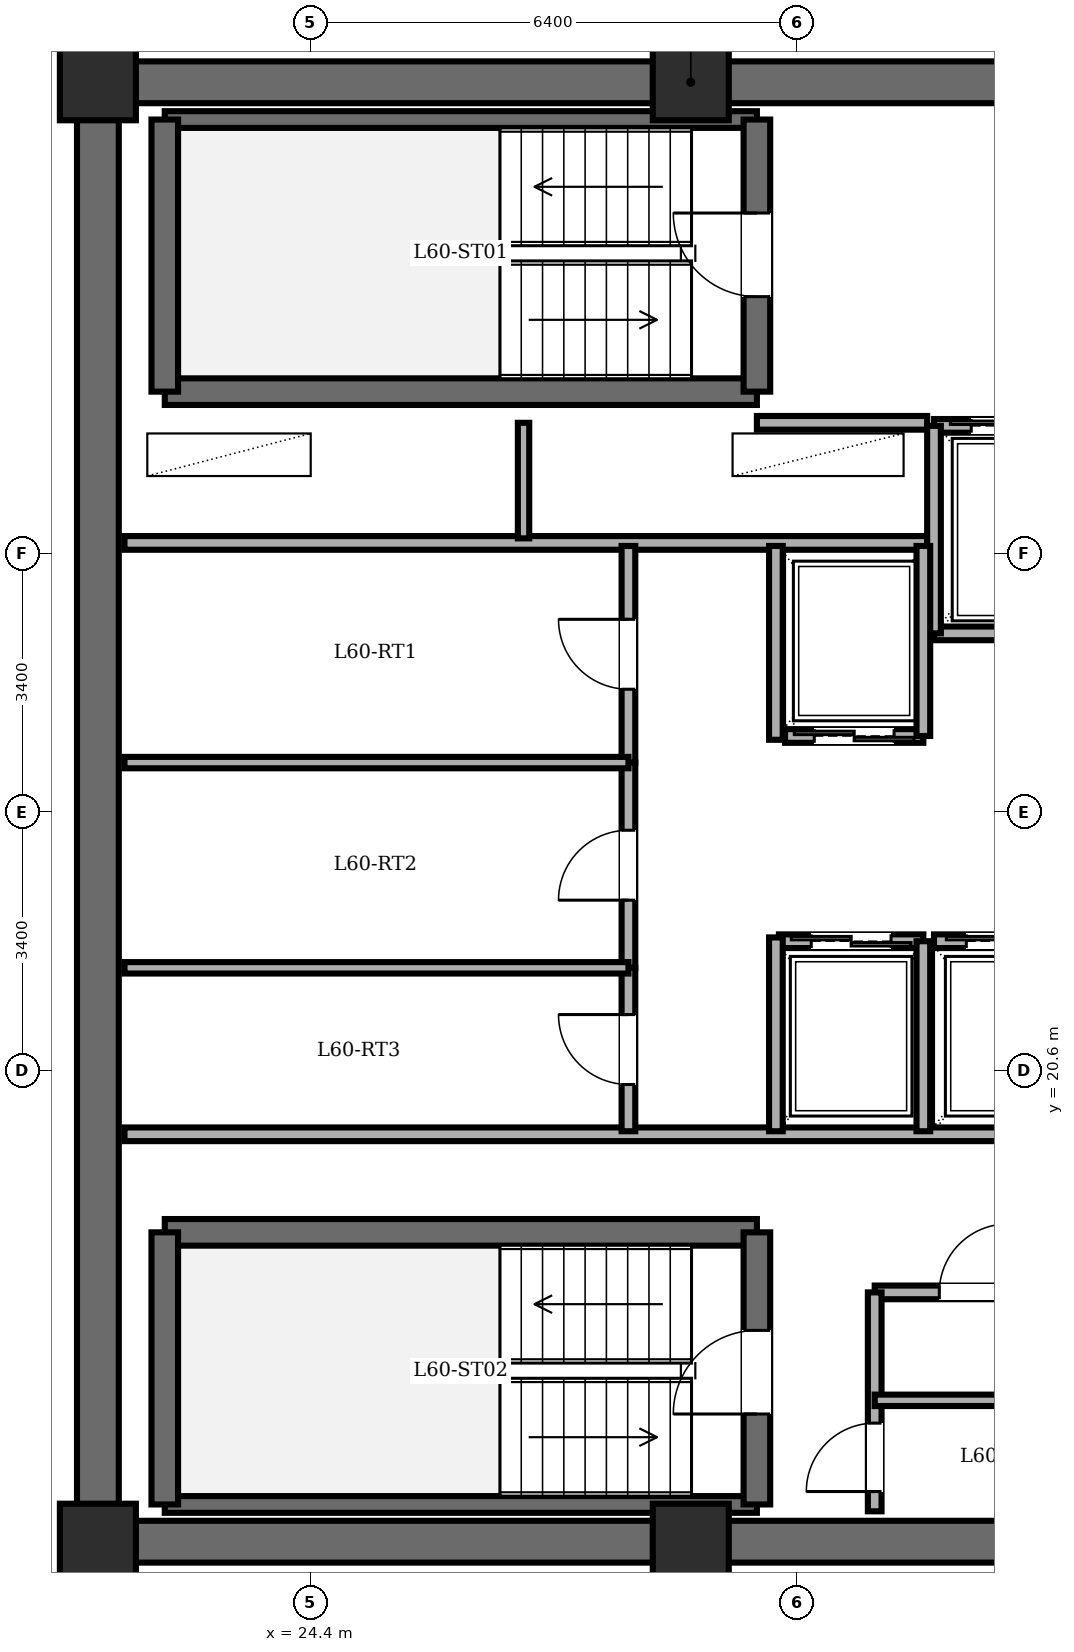
"""IFC4 building model, lengths in metres.
Left out: names, types, materials, properties, quantities, classifications, styles, units other than length and angle.
Written with IfcOpenShell. Run it as: python <this file> out.ifc"""

import sys

from ifc_helpers import new_model, si_unit, direction, frame, frame_2d, origin, origin_2d, place, context, subcontext, project, spatial, rectangle, extrude, element, fill, save


model = new_model("IFC4")
c1 = context("Model", 3, precision=1e-05, world=origin(), true_north=direction((0.0, 1.0)))
c2 = subcontext(c1, "Body", "Model", "MODEL_VIEW")
j1 = project(units=[si_unit("LENGTHUNIT", "METRE"), si_unit("PLANEANGLEUNIT", "RADIAN")], contexts=[c1])
p1 = place(None, origin())
s1 = spatial("IfcSite", under=j1, at=p1, CompositionType="ELEMENT")
p2 = place(p1, origin())
s2 = spatial("IfcBuilding", under=s1, at=p2, CompositionType="ELEMENT")
p3 = place(p2, frame((0.0, 0.0, 230.1)))
s3 = spatial("IfcBuildingStorey", under=s2, at=p3, CompositionType="ELEMENT", Elevation=230.1)
for number, where, z_axis, x_axis in (
    (1, (21.6, 14.4, 0.0), (0.0, 0.0, 1.0), (1.0, 0.0, 0.0)),
    (2, (29.4, 14.4, 0.0), (0.0, 0.0, 1.0), (1.0, 0.0, 0.0)),
    (3, (29.4, 33.6, 0.0), (0.0, 0.0, 1.0), (1.0, 0.0, 0.0)),
    (4, (21.6, 33.6, 0.0), (0.0, 0.0, 1.0), (1.0, 0.0, 0.0)),
):
    element("IfcColumn", number, at=place(p3, frame(where, z_axis=z_axis, x_axis=x_axis)), inside=s3, PredefinedType="COLUMN", context=c2, shape_type="SweptSolid", body=[
        extrude(rectangle(XDim=1.0, YDim=1.0, at=origin_2d()), origin(), (0.0, 0.0, 1.0), 3.6),
    ])
p4 = place(p3, frame((21.6, 14.4, 0.0), z_axis=(0.0, 0.0, 1.0), x_axis=(0.0, 1.0, 0.0)))
e5 = element("IfcWall", 5, at=p4, inside=s3, PredefinedType="SHEAR", context=c2, shape_type="SweptSolid", body=[
    extrude(rectangle(XDim=19.2, YDim=0.55, at=frame_2d((9.6, 0.0))), origin(), (0.0, 0.0, 1.0), 3.4),
])
for number, where, z_axis, x_axis in (
    (6, (21.6, 33.6, 0.0), (0.0, 0.0, 1.0), (1.0, 0.0, 0.0)),
    (7, (37.2, 14.4, 0.0), (0.0, 0.0, 1.0), (-1.0, 0.0, 0.0)),
):
    element("IfcWall", number, at=place(p3, frame(where, z_axis=z_axis, x_axis=x_axis)), inside=s3, PredefinedType="SHEAR", context=c2, shape_type="SweptSolid", body=[
        extrude(rectangle(XDim=15.6, YDim=0.55, at=frame_2d((7.8, 0.0))), origin(), (0.0, 0.0, 1.0), 3.4),
    ])
p5 = place(p3, frame((22.48, 29.53, 0.0), z_axis=(0.0, 0.0, 1.0), x_axis=(1.0, 0.0, 0.0)))
e8 = element("IfcWall", 8, at=p5, inside=s3, PredefinedType="SOLIDWALL", context=c2, shape_type="SweptSolid", body=[
    extrude(rectangle(XDim=7.79, YDim=0.35, at=frame_2d((3.895, 0.0))), origin(), (0.0, 0.0, 1.0), 3.4),
])
p6 = place(p3, frame((22.48, 33.11, 0.0), z_axis=(0.0, 0.0, 1.0), x_axis=(1.0, 0.0, 0.0)))
e9 = element("IfcWall", 9, at=p6, inside=s3, PredefinedType="PARTITIONING", context=c2, shape_type="SweptSolid", body=[
    extrude(rectangle(XDim=7.79, YDim=0.22, at=frame_2d((3.895, 0.0))), origin(), (0.0, 0.0, 1.0), 3.4),
])
p7 = place(p3, frame((22.48, 29.53, 0.0), z_axis=(0.0, 0.0, 1.0), x_axis=(0.0, 1.0, 0.0)))
e10 = element("IfcWall", 10, at=p7, inside=s3, PredefinedType="SOLIDWALL", context=c2, shape_type="SweptSolid", body=[
    extrude(rectangle(XDim=3.58, YDim=0.35, at=frame_2d((1.79, 0.0))), origin(), (0.0, 0.0, 1.0), 3.4),
])
p8 = place(p3, frame((30.27, 29.53, 0.0), z_axis=(0.0, 0.0, 1.0), x_axis=(0.0, 1.0, 0.0)))
e11 = element("IfcWall", 11, at=p8, inside=s3, PredefinedType="SOLIDWALL", context=c2, shape_type="SweptSolid", body=[
    extrude(rectangle(XDim=3.58, YDim=0.35, at=frame_2d((1.79, 0.0))), origin(), (0.0, 0.0, 1.0), 3.4),
])
p9 = place(p8, frame((1.25, 0.0, 0.0)))
e12 = element("IfcOpeningElement", 12, at=p9, cuts=e11, PredefinedType="OPENING", context=c2, shape_type="SweptSolid", body=[
    extrude(rectangle(XDim=1.1, YDim=2.15, at=frame_2d((0.55, 1.075))), frame((0.0, 0.185, 0.0), z_axis=(0.0, -1.0, 0.0), x_axis=(1.0, 0.0, 0.0)), (0.0, 0.0, 1.0), 0.37),
])
p10 = place(p3, frame((22.48, 18.47, 0.0), z_axis=(0.0, 0.0, 1.0), x_axis=(1.0, 0.0, 0.0)))
e13 = element("IfcWall", 13, at=p10, inside=s3, PredefinedType="SOLIDWALL", context=c2, shape_type="SweptSolid", body=[
    extrude(rectangle(XDim=7.79, YDim=0.35, at=frame_2d((3.895, 0.0))), origin(), (0.0, 0.0, 1.0), 3.4),
])
p11 = place(p3, frame((22.48, 14.89, 0.0), z_axis=(0.0, 0.0, 1.0), x_axis=(1.0, 0.0, 0.0)))
e14 = element("IfcWall", 14, at=p11, inside=s3, PredefinedType="PARTITIONING", context=c2, shape_type="SweptSolid", body=[
    extrude(rectangle(XDim=7.79, YDim=0.22, at=frame_2d((3.895, 0.0))), origin(), (0.0, 0.0, 1.0), 3.4),
])
p12 = place(p3, frame((22.48, 14.89, 0.0), z_axis=(0.0, 0.0, 1.0), x_axis=(0.0, 1.0, 0.0)))
e15 = element("IfcWall", 15, at=p12, inside=s3, PredefinedType="SOLIDWALL", context=c2, shape_type="SweptSolid", body=[
    extrude(rectangle(XDim=3.58, YDim=0.35, at=frame_2d((1.79, 0.0))), origin(), (0.0, 0.0, 1.0), 3.4),
])
p13 = place(p3, frame((30.27, 14.89, 0.0), z_axis=(0.0, 0.0, 1.0), x_axis=(0.0, 1.0, 0.0)))
e16 = element("IfcWall", 16, at=p13, inside=s3, PredefinedType="SOLIDWALL", context=c2, shape_type="SweptSolid", body=[
    extrude(rectangle(XDim=3.58, YDim=0.35, at=frame_2d((1.79, 0.0))), origin(), (0.0, 0.0, 1.0), 3.4),
])
p14 = place(p13, frame((1.19, 0.0, 0.0)))
e17 = element("IfcOpeningElement", 17, at=p14, cuts=e16, PredefinedType="OPENING", context=c2, shape_type="SweptSolid", body=[
    extrude(rectangle(XDim=1.1, YDim=2.15, at=frame_2d((0.55, 1.075))), frame((0.0, 0.185, 0.0), z_axis=(0.0, -1.0, 0.0), x_axis=(1.0, 0.0, 0.0)), (0.0, 0.0, 1.0), 0.37),
])
p15 = place(p3, frame((30.27, 29.12, 0.0), z_axis=(0.0, 0.0, 1.0), x_axis=(1.0, 0.0, 0.0)))
e18 = element("IfcWall", 18, at=p15, inside=s3, PredefinedType="PARTITIONING", context=c2, shape_type="SweptSolid", body=[
    extrude(rectangle(XDim=2.24, YDim=0.18, at=frame_2d((1.12, 0.0))), origin(), (0.0, 0.0, 1.0), 3.4),
])
p16 = place(p3, frame((21.95, 27.54, 0.0), z_axis=(0.0, 0.0, 1.0), x_axis=(1.0, 0.0, 0.0)))
e19 = element("IfcWall", 19, at=p16, inside=s3, PredefinedType="PARTITIONING", context=c2, shape_type="SweptSolid", body=[
    extrude(rectangle(XDim=10.56, YDim=0.18, at=frame_2d((5.28, 0.0))), origin(), (0.0, 0.0, 1.0), 3.4),
])
p17 = place(p3, frame((27.2, 27.6, 0.0), z_axis=(0.0, 0.0, 1.0), x_axis=(0.0, 1.0, 0.0)))
e20 = element("IfcWall", 20, at=p17, inside=s3, PredefinedType="PARTITIONING", context=c2, shape_type="SweptSolid", body=[
    extrude(rectangle(XDim=1.52, YDim=0.15, at=frame_2d((0.76, 0.0))), origin(), (0.0, 0.0, 1.0), 3.4),
])
p18 = place(p3, frame((21.95, 19.76, 0.0), z_axis=(0.0, 0.0, 1.0), x_axis=(1.0, 0.0, 0.0)))
e21 = element("IfcWall", 21, at=p18, inside=s3, PredefinedType="PARTITIONING", context=c2, shape_type="SweptSolid", body=[
    extrude(rectangle(XDim=14.87, YDim=0.18, at=frame_2d((7.435, 0.0))), origin(), (0.0, 0.0, 1.0), 3.4),
])
p19 = place(p3, frame((31.82, 17.68, 0.0), z_axis=(0.0, 0.0, 1.0), x_axis=(1.0, 0.0, 0.0)))
e22 = element("IfcWall", 22, at=p19, inside=s3, PredefinedType="PARTITIONING", context=c2, shape_type="SweptSolid", body=[
    extrude(rectangle(XDim=2.66, YDim=0.18, at=frame_2d((1.33, 0.0))), origin(), (0.0, 0.0, 1.0), 3.4),
])
p20 = place(p19, frame((0.85, 0.0, 0.0)))
e23 = element("IfcOpeningElement", 23, at=p20, cuts=e22, PredefinedType="OPENING", context=c2, shape_type="SweptSolid", body=[
    extrude(rectangle(XDim=0.9, YDim=2.05, at=frame_2d((0.45, 1.025))), frame((0.0, 0.1, 0.0), z_axis=(0.0, -1.0, 0.0), x_axis=(1.0, 0.0, 0.0)), (0.0, 0.0, 1.0), 0.2),
])
p21 = place(p3, frame((31.82, 14.8, 0.0), z_axis=(0.0, 0.0, 1.0), x_axis=(0.0, 1.0, 0.0)))
e24 = element("IfcWall", 24, at=p21, inside=s3, PredefinedType="PARTITIONING", context=c2, shape_type="SweptSolid", body=[
    extrude(rectangle(XDim=2.88, YDim=0.18, at=frame_2d((1.44, 0.0))), origin(), (0.0, 0.0, 1.0), 3.4),
])
p22 = place(p21, frame((0.26, 0.0, 0.0)))
e25 = element("IfcOpeningElement", 25, at=p22, cuts=e24, PredefinedType="OPENING", context=c2, shape_type="SweptSolid", body=[
    extrude(rectangle(XDim=0.9, YDim=2.05, at=frame_2d((0.45, 1.025))), frame((0.0, 0.1, 0.0), z_axis=(0.0, -1.0, 0.0), x_axis=(1.0, 0.0, 0.0)), (0.0, 0.0, 1.0), 0.2),
])
p23 = place(p3, frame((31.82, 16.26, 0.0), z_axis=(0.0, 0.0, 1.0), x_axis=(1.0, 0.0, 0.0)))
e26 = element("IfcWall", 26, at=p23, inside=s3, PredefinedType="PARTITIONING", context=c2, shape_type="SweptSolid", body=[
    extrude(rectangle(XDim=2.66, YDim=0.15, at=frame_2d((1.33, 0.0))), origin(), (0.0, 0.0, 1.0), 3.4),
])
p24 = place(p3, frame((32.6, 29.08, 0.0), z_axis=(0.0, 0.0, 1.0), x_axis=(1.0, 0.0, 0.0)))
e27 = element("IfcWall", 27, at=p24, inside=s3, PredefinedType="PARTITIONING", context=c2, shape_type="SweptSolid", body=[
    extrude(rectangle(XDim=2.08, YDim=0.18, at=frame_2d((1.04, 0.0))), origin(), (0.0, 0.0, 1.0), 3.4),
])
p25 = place(p24, frame((0.49, 0.0, 0.0)))
e28 = element("IfcOpeningElement", 28, at=p25, cuts=e27, PredefinedType="OPENING", context=c2, shape_type="SweptSolid", body=[
    extrude(rectangle(XDim=1.1, YDim=2.2, at=frame_2d((0.55, 1.1))), frame((0.0, 0.1, 0.0), z_axis=(0.0, -1.0, 0.0), x_axis=(1.0, 0.0, 0.0)), (0.0, 0.0, 1.0), 0.2),
])
p26 = place(p3, frame((34.68, 26.35, 0.0), z_axis=(0.0, 0.0, 1.0), x_axis=(-1.0, 0.0, 0.0)))
e29 = element("IfcWall", 29, at=p26, inside=s3, PredefinedType="PARTITIONING", context=c2, shape_type="SweptSolid", body=[
    extrude(rectangle(XDim=2.08, YDim=0.18, at=frame_2d((1.04, 0.0))), origin(), (0.0, 0.0, 1.0), 3.4),
])
p27 = place(p3, frame((32.6, 29.08, 0.0), z_axis=(0.0, 0.0, 1.0), x_axis=(0.0, -1.0, 0.0)))
e30 = element("IfcWall", 30, at=p27, inside=s3, PredefinedType="PARTITIONING", context=c2, shape_type="SweptSolid", body=[
    extrude(rectangle(XDim=2.73, YDim=0.18, at=frame_2d((1.365, 0.0))), origin(), (0.0, 0.0, 1.0), 3.4),
])
p28 = place(p3, frame((32.46, 25.0, 0.0), z_axis=(0.0, 0.0, 1.0), x_axis=(-1.0, 0.0, 0.0)))
e31 = element("IfcWall", 31, at=p28, inside=s3, PredefinedType="PARTITIONING", context=c2, shape_type="SweptSolid", body=[
    extrude(rectangle(XDim=1.82, YDim=0.18, at=frame_2d((0.91, 0.0))), origin(), (0.0, 0.0, 1.0), 3.4),
])
p29 = place(p28, frame((0.385, 0.0, 0.0)))
e32 = element("IfcOpeningElement", 32, at=p29, cuts=e31, PredefinedType="OPENING", context=c2, shape_type="SweptSolid", body=[
    extrude(rectangle(XDim=1.05, YDim=2.2, at=frame_2d((0.525, 1.1))), frame((0.0, 0.1, 0.0), z_axis=(0.0, -1.0, 0.0), x_axis=(1.0, 0.0, 0.0)), (0.0, 0.0, 1.0), 0.2),
])
p30 = place(p3, frame((32.46, 25.0, 0.0), z_axis=(0.0, 0.0, 1.0), x_axis=(0.0, 1.0, 0.0)))
e33 = element("IfcWall", 33, at=p30, inside=s3, PredefinedType="PARTITIONING", context=c2, shape_type="SweptSolid", body=[
    extrude(rectangle(XDim=2.5, YDim=0.18, at=frame_2d((1.25, 0.0))), origin(), (0.0, 0.0, 1.0), 3.4),
])
p31 = place(p3, frame((30.56, 22.3, 0.0), z_axis=(0.0, 0.0, 1.0), x_axis=(1.0, 0.0, 0.0)))
e34 = element("IfcWall", 34, at=p31, inside=s3, PredefinedType="PARTITIONING", context=c2, shape_type="SweptSolid", body=[
    extrude(rectangle(XDim=1.9, YDim=0.18, at=frame_2d((0.95, 0.0))), origin(), (0.0, 0.0, 1.0), 3.4),
])
p32 = place(p31, frame((0.425, 0.0, 0.0)))
e35 = element("IfcOpeningElement", 35, at=p32, cuts=e34, PredefinedType="OPENING", context=c2, shape_type="SweptSolid", body=[
    extrude(rectangle(XDim=1.05, YDim=2.2, at=frame_2d((0.525, 1.1))), frame((0.0, 0.1, 0.0), z_axis=(0.0, -1.0, 0.0), x_axis=(1.0, 0.0, 0.0)), (0.0, 0.0, 1.0), 0.2),
])
p33 = place(p3, frame((32.46, 19.8, 0.0), z_axis=(0.0, 0.0, 1.0), x_axis=(0.0, 1.0, 0.0)))
e36 = element("IfcWall", 36, at=p33, inside=s3, PredefinedType="PARTITIONING", context=c2, shape_type="SweptSolid", body=[
    extrude(rectangle(XDim=2.5, YDim=0.18, at=frame_2d((1.25, 0.0))), origin(), (0.0, 0.0, 1.0), 3.4),
])
p34 = place(p3, frame((32.6, 22.3, 0.0), z_axis=(0.0, 0.0, 1.0), x_axis=(1.0, 0.0, 0.0)))
e37 = element("IfcWall", 37, at=p34, inside=s3, PredefinedType="PARTITIONING", context=c2, shape_type="SweptSolid", body=[
    extrude(rectangle(XDim=1.9, YDim=0.18, at=frame_2d((0.95, 0.0))), origin(), (0.0, 0.0, 1.0), 3.4),
])
p35 = place(p34, frame((0.425, 0.0, 0.0)))
e38 = element("IfcOpeningElement", 38, at=p35, cuts=e37, PredefinedType="OPENING", context=c2, shape_type="SweptSolid", body=[
    extrude(rectangle(XDim=1.05, YDim=2.2, at=frame_2d((0.525, 1.1))), frame((0.0, 0.1, 0.0), z_axis=(0.0, -1.0, 0.0), x_axis=(1.0, 0.0, 0.0)), (0.0, 0.0, 1.0), 0.2),
])
for number, where, z_axis, x_axis in (
    (39, (30.52, 24.95, 0.0), (0.0, 0.0, 1.0), (0.0, 1.0, 0.0)),
    (40, (30.52, 19.8, 0.0), (0.0, 0.0, 1.0), (0.0, 1.0, 0.0)),
):
    element("IfcWall", number, at=place(p3, frame(where, z_axis=z_axis, x_axis=x_axis)), inside=s3, PredefinedType="PARTITIONING", context=c2, shape_type="SweptSolid", body=[
        extrude(rectangle(XDim=2.55, YDim=0.18, at=frame_2d((1.275, 0.0))), origin(), (0.0, 0.0, 1.0), 3.4),
    ])
p36 = place(p3, frame((28.58, 24.65, 0.0), z_axis=(0.0, 0.0, 1.0), x_axis=(0.0, 1.0, 0.0)))
e41 = element("IfcWall", 41, at=p36, inside=s3, PredefinedType="PARTITIONING", context=c2, shape_type="SweptSolid", body=[
    extrude(rectangle(XDim=2.85, YDim=0.18, at=frame_2d((1.425, 0.0))), origin(), (0.0, 0.0, 1.0), 3.4),
])
p37 = place(p36, frame((0.965, 0.0, 0.0)))
e42 = element("IfcOpeningElement", 42, at=p37, cuts=e41, PredefinedType="OPENING", context=c2, shape_type="SweptSolid", body=[
    extrude(rectangle(XDim=0.92, YDim=2.1, at=frame_2d((0.46, 1.05))), frame((0.0, 0.1, 0.0), z_axis=(0.0, -1.0, 0.0), x_axis=(1.0, 0.0, 0.0)), (0.0, 0.0, 1.0), 0.2),
])
p38 = place(p3, frame((28.58, 21.95, 0.0), z_axis=(0.0, 0.0, 1.0), x_axis=(0.0, 1.0, 0.0)))
e43 = element("IfcWall", 43, at=p38, inside=s3, PredefinedType="PARTITIONING", context=c2, shape_type="SweptSolid", body=[
    extrude(rectangle(XDim=2.7, YDim=0.18, at=frame_2d((1.35, 0.0))), origin(), (0.0, 0.0, 1.0), 3.4),
])
p39 = place(p38, frame((0.89, 0.0, 0.0)))
e44 = element("IfcOpeningElement", 44, at=p39, cuts=e43, PredefinedType="OPENING", context=c2, shape_type="SweptSolid", body=[
    extrude(rectangle(XDim=0.92, YDim=2.1, at=frame_2d((0.46, 1.05))), frame((0.0, 0.1, 0.0), z_axis=(0.0, -1.0, 0.0), x_axis=(1.0, 0.0, 0.0)), (0.0, 0.0, 1.0), 0.2),
])
p40 = place(p3, frame((28.58, 19.8, 0.0), z_axis=(0.0, 0.0, 1.0), x_axis=(0.0, 1.0, 0.0)))
e45 = element("IfcWall", 45, at=p40, inside=s3, PredefinedType="PARTITIONING", context=c2, shape_type="SweptSolid", body=[
    extrude(rectangle(XDim=2.15, YDim=0.18, at=frame_2d((1.075, 0.0))), origin(), (0.0, 0.0, 1.0), 3.4),
])
p41 = place(p40, frame((0.615, 0.0, 0.0)))
e46 = element("IfcOpeningElement", 46, at=p41, cuts=e45, PredefinedType="OPENING", context=c2, shape_type="SweptSolid", body=[
    extrude(rectangle(XDim=0.92, YDim=2.1, at=frame_2d((0.46, 1.05))), frame((0.0, 0.1, 0.0), z_axis=(0.0, -1.0, 0.0), x_axis=(1.0, 0.0, 0.0)), (0.0, 0.0, 1.0), 0.2),
])
for number, where, z_axis, x_axis in (
    (47, (21.95, 24.65, 0.0), (0.0, 0.0, 1.0), (1.0, 0.0, 0.0)),
    (48, (21.95, 21.95, 0.0), (0.0, 0.0, 1.0), (1.0, 0.0, 0.0)),
):
    element("IfcWall", number, at=place(p3, frame(where, z_axis=z_axis, x_axis=x_axis)), inside=s3, PredefinedType="PARTITIONING", context=c2, shape_type="SweptSolid", body=[
        extrude(rectangle(XDim=6.63, YDim=0.15, at=frame_2d((3.315, 0.0))), origin(), (0.0, 0.0, 1.0), 3.4),
    ])
p42 = place(p9, origin())
e49 = element("IfcDoor", 49, at=p42, inside=s3, OperationType="SINGLE_SWING_RIGHT", PredefinedType="DOOR", context=c2, shape_type="SweptSolid", body=[
    extrude(rectangle(XDim=1.1, YDim=2.15, at=frame_2d((0.55, 1.075))), frame((0.0, 0.025, 0.0), z_axis=(0.0, -1.0, 0.0), x_axis=(1.0, 0.0, 0.0)), (0.0, 0.0, 1.0), 0.05),
])
fill(e12, e49)
p43 = place(p14, origin())
e50 = element("IfcDoor", 50, at=p43, inside=s3, OperationType="SINGLE_SWING_LEFT", PredefinedType="DOOR", context=c2, shape_type="SweptSolid", body=[
    extrude(rectangle(XDim=1.1, YDim=2.15, at=frame_2d((0.55, 1.075))), frame((0.0, 0.025, 0.0), z_axis=(0.0, -1.0, 0.0), x_axis=(1.0, 0.0, 0.0)), (0.0, 0.0, 1.0), 0.05),
])
fill(e17, e50)
p44 = place(p20, origin())
e51 = element("IfcDoor", 51, at=p44, inside=s3, OperationType="SINGLE_SWING_RIGHT", PredefinedType="DOOR", context=c2, shape_type="SweptSolid", body=[
    extrude(rectangle(XDim=0.9, YDim=2.05, at=frame_2d((0.45, 1.025))), frame((0.0, 0.025, 0.0), z_axis=(0.0, -1.0, 0.0), x_axis=(1.0, 0.0, 0.0)), (0.0, 0.0, 1.0), 0.05),
])
fill(e23, e51)
p45 = place(p22, origin())
e52 = element("IfcDoor", 52, at=p45, inside=s3, OperationType="SINGLE_SWING_LEFT", PredefinedType="DOOR", context=c2, shape_type="SweptSolid", body=[
    extrude(rectangle(XDim=0.9, YDim=2.05, at=frame_2d((0.45, 1.025))), frame((0.0, 0.025, 0.0), z_axis=(0.0, -1.0, 0.0), x_axis=(1.0, 0.0, 0.0)), (0.0, 0.0, 1.0), 0.05),
])
fill(e25, e52)
p46 = place(p25, origin())
e53 = element("IfcDoor", 53, at=p46, inside=s3, OperationType="DOUBLE_DOOR_SLIDING", PredefinedType="DOOR", context=c2, shape_type="SweptSolid", body=[
    extrude(rectangle(XDim=1.1, YDim=2.2, at=frame_2d((0.55, 1.1))), frame((0.0, 0.025, 0.0), z_axis=(0.0, -1.0, 0.0), x_axis=(1.0, 0.0, 0.0)), (0.0, 0.0, 1.0), 0.05),
])
fill(e28, e53)
p47 = place(p29, origin())
e54 = element("IfcDoor", 54, at=p47, inside=s3, OperationType="DOUBLE_DOOR_SLIDING", PredefinedType="DOOR", context=c2, shape_type="SweptSolid", body=[
    extrude(rectangle(XDim=1.05, YDim=2.2, at=frame_2d((0.525, 1.1))), frame((0.0, 0.025, 0.0), z_axis=(0.0, -1.0, 0.0), x_axis=(1.0, 0.0, 0.0)), (0.0, 0.0, 1.0), 0.05),
])
fill(e32, e54)
p48 = place(p32, origin())
e55 = element("IfcDoor", 55, at=p48, inside=s3, OperationType="DOUBLE_DOOR_SLIDING", PredefinedType="DOOR", context=c2, shape_type="SweptSolid", body=[
    extrude(rectangle(XDim=1.05, YDim=2.2, at=frame_2d((0.525, 1.1))), frame((0.0, 0.025, 0.0), z_axis=(0.0, -1.0, 0.0), x_axis=(1.0, 0.0, 0.0)), (0.0, 0.0, 1.0), 0.05),
])
fill(e35, e55)
p49 = place(p35, origin())
e56 = element("IfcDoor", 56, at=p49, inside=s3, OperationType="DOUBLE_DOOR_SLIDING", PredefinedType="DOOR", context=c2, shape_type="SweptSolid", body=[
    extrude(rectangle(XDim=1.05, YDim=2.2, at=frame_2d((0.525, 1.1))), frame((0.0, 0.025, 0.0), z_axis=(0.0, -1.0, 0.0), x_axis=(1.0, 0.0, 0.0)), (0.0, 0.0, 1.0), 0.05),
])
fill(e38, e56)
p50 = place(p37, origin())
e57 = element("IfcDoor", 57, at=p50, inside=s3, OperationType="SINGLE_SWING_RIGHT", PredefinedType="DOOR", context=c2, shape_type="SweptSolid", body=[
    extrude(rectangle(XDim=0.92, YDim=2.1, at=frame_2d((0.46, 1.05))), frame((0.0, 0.025, 0.0), z_axis=(0.0, -1.0, 0.0), x_axis=(1.0, 0.0, 0.0)), (0.0, 0.0, 1.0), 0.05),
])
fill(e42, e57)
p51 = place(p39, origin())
e58 = element("IfcDoor", 58, at=p51, inside=s3, OperationType="SINGLE_SWING_LEFT", PredefinedType="DOOR", context=c2, shape_type="SweptSolid", body=[
    extrude(rectangle(XDim=0.92, YDim=2.1, at=frame_2d((0.46, 1.05))), frame((0.0, 0.025, 0.0), z_axis=(0.0, -1.0, 0.0), x_axis=(1.0, 0.0, 0.0)), (0.0, 0.0, 1.0), 0.05),
])
fill(e44, e58)
p52 = place(p41, origin())
e59 = element("IfcDoor", 59, at=p52, inside=s3, OperationType="SINGLE_SWING_RIGHT", PredefinedType="DOOR", context=c2, shape_type="SweptSolid", body=[
    extrude(rectangle(XDim=0.92, YDim=2.1, at=frame_2d((0.46, 1.05))), frame((0.0, 0.025, 0.0), z_axis=(0.0, -1.0, 0.0), x_axis=(1.0, 0.0, 0.0)), (0.0, 0.0, 1.0), 0.05),
])
fill(e46, e59)
save(model, sys.argv[1])
